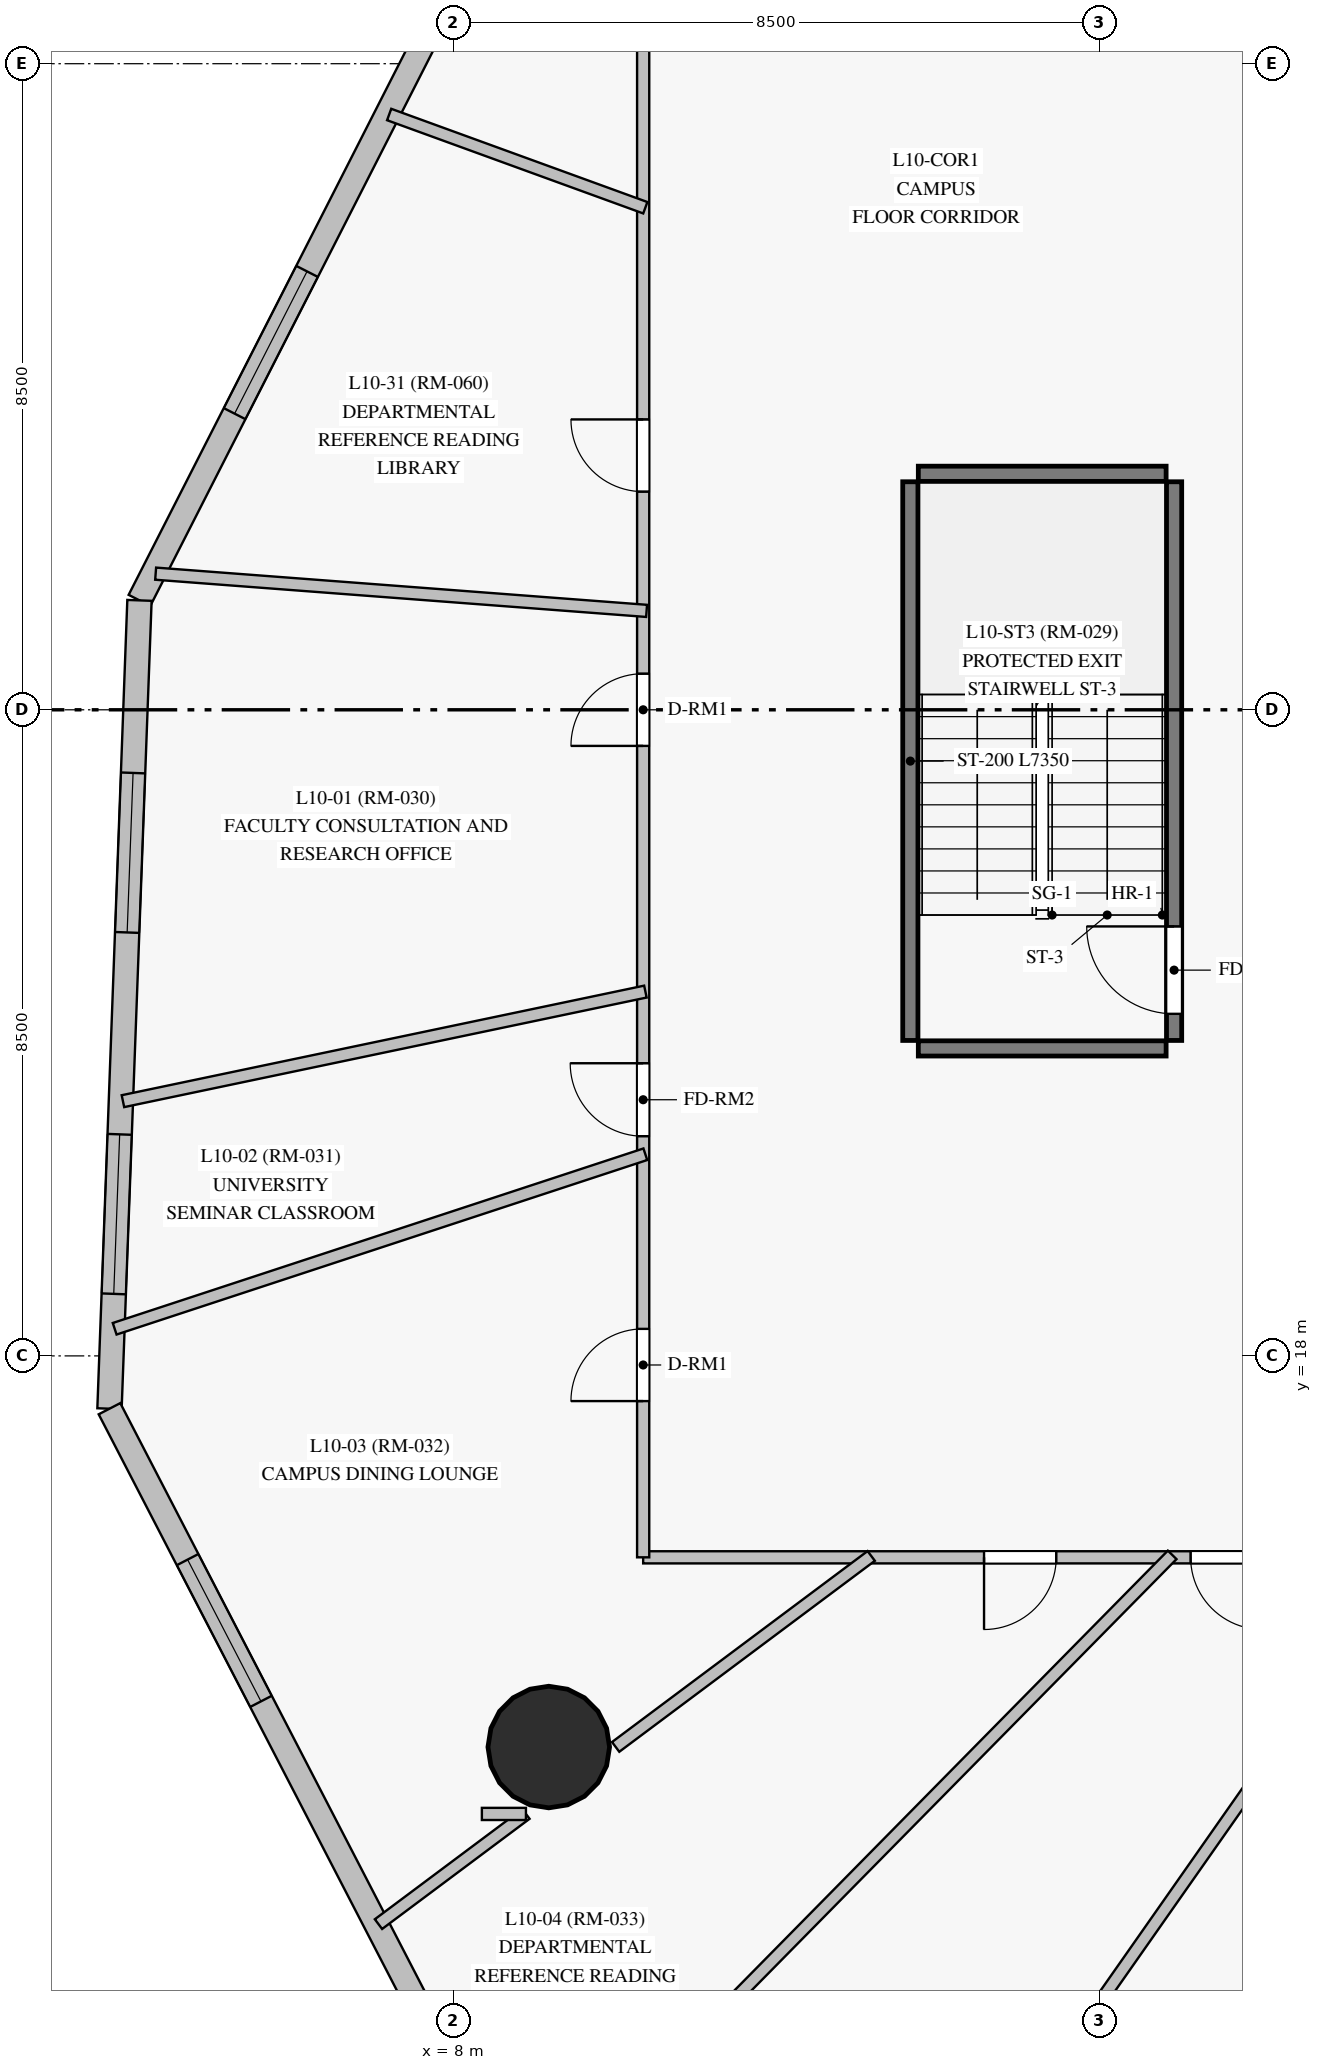
"""IFC4 building model, lengths in metres.
Left out: names, types, materials, properties, quantities, classifications, styles, units other than length and angle.
Written with IfcOpenShell. Run it as: python <this file> out.ifc"""

import sys

from ifc_helpers import new_model, si_unit, direction, frame, frame_2d, origin, origin_with_axes, origin_2d, place, context, subcontext, project, spatial, rectangle, circle, extrude, source, transform, mapped, element, fill, save


model = new_model("IFC4")
c1 = context("Model", 3, precision=1e-05, world=origin(), true_north=direction((0.0, 1.0)))
c2 = subcontext(c1, "Body", "Model", "MODEL_VIEW")
j1 = project(units=[si_unit("LENGTHUNIT", "METRE"), si_unit("PLANEANGLEUNIT", "RADIAN")], contexts=[c1])
p1 = place(None, origin())
s1 = spatial("IfcSite", under=j1, at=p1, CompositionType="ELEMENT")
p2 = place(p1, origin())
s2 = spatial("IfcBuilding", under=s1, at=p2, CompositionType="ELEMENT")
p3 = place(p2, frame((0.0, 0.0, 40.9)))
s3 = spatial("IfcBuildingStorey", under=s2, at=p3, CompositionType="ELEMENT", Elevation=40.9)
m1 = source(origin_with_axes(), c2, "Body", "SweptSolid", [
    extrude(circle(Radius=0.8, at=origin_2d()), origin(), (0.0, 0.0, 1.0), 3.6),
])
p4 = place(p3, frame((9.258, 12.854, 0.0), z_axis=(0.0, 0.0, 1.0), x_axis=(1.0, 0.0, 0.0)))
e1 = element("IfcColumn", 1, at=p4, inside=s3, PredefinedType="COLUMN", context=c2, shape_type="MappedRepresentation", body=[
    mapped(m1, transform((0.0, 0.0, 0.0), scale=1.0)),
])
p5 = place(p3, frame((10.893, 41.719, 0.0), z_axis=(0.0, 0.0, 1.0), x_axis=(-0.453939025407, -0.891032749798, 0.0)))
e2 = element("IfcWall", 2, at=p5, inside=s3, PredefinedType="SOLIDWALL", context=c2, shape_type="SweptSolid", body=[
    extrude(rectangle(XDim=15.464, YDim=0.32, at=frame_2d((7.732, 0.0))), origin(), (0.0, 0.0, 1.0), 3.35),
])
p6 = place(p5, frame((1.223, 0.0, 0.85)))
e3 = element("IfcOpeningElement", 3, at=p6, cuts=e2, PredefinedType="OPENING", context=c2, shape_type="SweptSolid", body=[
    extrude(rectangle(XDim=2.1, YDim=1.95, at=frame_2d((1.05, 0.975))), frame((0.0, 0.17, 0.0), z_axis=(0.0, -1.0, 0.0), x_axis=(1.0, 0.0, 0.0)), (0.0, 0.0, 1.0), 0.34),
])
p7 = place(p5, frame((5.01, 0.0, 0.85)))
e4 = element("IfcOpeningElement", 4, at=p7, cuts=e2, PredefinedType="OPENING", context=c2, shape_type="SweptSolid", body=[
    extrude(rectangle(XDim=2.1, YDim=1.95, at=frame_2d((1.05, 0.975))), frame((0.0, 0.17, 0.0), z_axis=(0.0, -1.0, 0.0), x_axis=(1.0, 0.0, 0.0)), (0.0, 0.0, 1.0), 0.34),
])
p8 = place(p5, frame((10.607, 0.0, 0.85)))
e5 = element("IfcOpeningElement", 5, at=p8, cuts=e2, PredefinedType="OPENING", context=c2, shape_type="SweptSolid", body=[
    extrude(rectangle(XDim=2.1, YDim=1.95, at=frame_2d((1.05, 0.975))), frame((0.0, 0.17, 0.0), z_axis=(0.0, -1.0, 0.0), x_axis=(1.0, 0.0, 0.0)), (0.0, 0.0, 1.0), 0.34),
])
p9 = place(p3, frame((3.873, 27.939, 0.0), z_axis=(0.0, 0.0, 1.0), x_axis=(-0.037051542076, -0.999313355875, 0.0)))
e6 = element("IfcWall", 6, at=p9, inside=s3, PredefinedType="SOLIDWALL", context=c2, shape_type="SweptSolid", body=[
    extrude(rectangle(XDim=10.642, YDim=0.32, at=frame_2d((5.321, 0.0))), origin(), (0.0, 0.0, 1.0), 3.35),
])
p10 = place(p9, frame((2.272, 0.0, 0.85)))
e7 = element("IfcOpeningElement", 7, at=p10, cuts=e6, PredefinedType="OPENING", context=c2, shape_type="SweptSolid", body=[
    extrude(rectangle(XDim=2.1, YDim=1.95, at=frame_2d((1.05, 0.975))), frame((0.0, 0.17, 0.0), z_axis=(0.0, -1.0, 0.0), x_axis=(1.0, 0.0, 0.0)), (0.0, 0.0, 1.0), 0.34),
])
p11 = place(p9, frame((7.03, 0.0, 0.85)))
e8 = element("IfcOpeningElement", 8, at=p11, cuts=e6, PredefinedType="OPENING", context=c2, shape_type="SweptSolid", body=[
    extrude(rectangle(XDim=2.1, YDim=1.95, at=frame_2d((1.05, 0.975))), frame((0.0, 0.17, 0.0), z_axis=(0.0, -1.0, 0.0), x_axis=(1.0, 0.0, 0.0)), (0.0, 0.0, 1.0), 0.34),
])
p12 = place(p3, frame((3.479, 17.305, 0.0), z_axis=(0.0, 0.0, 1.0), x_axis=(0.459668719491, -0.888090461789, 0.0)))
e9 = element("IfcWall", 9, at=p12, inside=s3, PredefinedType="SOLIDWALL", context=c2, shape_type="SweptSolid", body=[
    extrude(rectangle(XDim=13.212, YDim=0.32, at=frame_2d((6.606, 0.0))), origin(), (0.0, 0.0, 1.0), 3.35),
])
p13 = place(p12, frame((2.236, 0.0, 0.85)))
e10 = element("IfcOpeningElement", 10, at=p13, cuts=e9, PredefinedType="OPENING", context=c2, shape_type="SweptSolid", body=[
    extrude(rectangle(XDim=2.1, YDim=1.95, at=frame_2d((1.05, 0.975))), frame((0.0, 0.17, 0.0), z_axis=(0.0, -1.0, 0.0), x_axis=(1.0, 0.0, 0.0)), (0.0, 0.0, 1.0), 0.34),
])
p14 = place(p3, frame((14.015, 22.15, 0.0), z_axis=(0.0, 0.0, 1.0), x_axis=(0.0, 1.0, 0.0)))
e11 = element("IfcWall", 11, at=p14, inside=s3, PredefinedType="SHEAR", context=c2, shape_type="SweptSolid", body=[
    extrude(rectangle(XDim=7.35, YDim=0.2, at=frame_2d((3.675, 0.0))), origin(), (0.0, 0.0, 1.0), 3.35),
])
p15 = place(p3, frame((17.485, 22.15, 0.0), z_axis=(0.0, 0.0, 1.0), x_axis=(0.0, 1.0, 0.0)))
e12 = element("IfcWall", 12, at=p15, inside=s3, PredefinedType="SHEAR", context=c2, shape_type="SweptSolid", body=[
    extrude(rectangle(XDim=7.35, YDim=0.2, at=frame_2d((3.675, 0.0))), origin(), (0.0, 0.0, 1.0), 3.35),
])
p16 = place(p15, frame((0.35, 0.0, 0.0)))
e13 = element("IfcOpeningElement", 13, at=p16, cuts=e12, PredefinedType="OPENING", context=c2, shape_type="SweptSolid", body=[
    extrude(rectangle(XDim=1.15, YDim=2.15, at=frame_2d((0.575, 1.075))), frame((0.0, 0.11, 0.0), z_axis=(0.0, -1.0, 0.0), x_axis=(1.0, 0.0, 0.0)), (0.0, 0.0, 1.0), 0.22),
])
for number, where, z_axis, x_axis in (
    (14, (14.12, 22.045, 0.0), (0.0, 0.0, 1.0), (1.0, 0.0, 0.0)),
    (15, (14.12, 29.605, 0.0), (0.0, 0.0, 1.0), (1.0, 0.0, 0.0)),
):
    element("IfcWall", number, at=place(p3, frame(where, z_axis=z_axis, x_axis=x_axis)), inside=s3, PredefinedType="SHEAR", context=c2, shape_type="SweptSolid", body=[
        extrude(rectangle(XDim=3.26, YDim=0.2, at=frame_2d((1.63, 0.0))), origin(), (0.0, 0.0, 1.0), 3.35),
    ])
p17 = place(p3, frame((40.25, 15.35, 0.0), z_axis=(0.0, 0.0, 1.0), x_axis=(-1.0, 0.0, 0.0)))
e16 = element("IfcWall", 16, at=p17, inside=s3, PredefinedType="PARTITIONING", context=c2, shape_type="SweptSolid", body=[
    extrude(rectangle(XDim=29.75, YDim=0.16, at=frame_2d((14.875, 0.0))), origin(), (0.0, 0.0, 1.0), 2.7),
])
p18 = place(p17, frame((24.315, 0.0, 0.0)))
e17 = element("IfcOpeningElement", 17, at=p18, cuts=e16, PredefinedType="OPENING", context=c2, shape_type="SweptSolid", body=[
    extrude(rectangle(XDim=0.95, YDim=2.15, at=frame_2d((0.475, 1.075))), frame((0.0, 0.09, 0.0), z_axis=(0.0, -1.0, 0.0), x_axis=(1.0, 0.0, 0.0)), (0.0, 0.0, 1.0), 0.18),
])
p19 = place(p17, frame((21.597, 0.0, 0.0)))
e18 = element("IfcOpeningElement", 18, at=p19, cuts=e16, PredefinedType="OPENING", context=c2, shape_type="SweptSolid", body=[
    extrude(rectangle(XDim=0.95, YDim=2.15, at=frame_2d((0.475, 1.075))), frame((0.0, 0.09, 0.0), z_axis=(0.0, -1.0, 0.0), x_axis=(1.0, 0.0, 0.0)), (0.0, 0.0, 1.0), 0.18),
])
p20 = place(p17, frame((18.423, 0.0, 0.0)))
e19 = element("IfcOpeningElement", 19, at=p20, cuts=e16, PredefinedType="OPENING", context=c2, shape_type="SweptSolid", body=[
    extrude(rectangle(XDim=0.95, YDim=2.15, at=frame_2d((0.475, 1.075))), frame((0.0, 0.09, 0.0), z_axis=(0.0, -1.0, 0.0), x_axis=(1.0, 0.0, 0.0)), (0.0, 0.0, 1.0), 0.18),
])
p21 = place(p17, frame((15.67, 0.0, 0.0)))
e20 = element("IfcOpeningElement", 20, at=p21, cuts=e16, PredefinedType="OPENING", context=c2, shape_type="SweptSolid", body=[
    extrude(rectangle(XDim=0.95, YDim=2.15, at=frame_2d((0.475, 1.075))), frame((0.0, 0.09, 0.0), z_axis=(0.0, -1.0, 0.0), x_axis=(1.0, 0.0, 0.0)), (0.0, 0.0, 1.0), 0.18),
])
p22 = place(p17, frame((13.91, 0.0, 0.0)))
e21 = element("IfcOpeningElement", 21, at=p22, cuts=e16, PredefinedType="OPENING", context=c2, shape_type="SweptSolid", body=[
    extrude(rectangle(XDim=0.95, YDim=2.15, at=frame_2d((0.475, 1.075))), frame((0.0, 0.09, 0.0), z_axis=(0.0, -1.0, 0.0), x_axis=(1.0, 0.0, 0.0)), (0.0, 0.0, 1.0), 0.18),
])
p23 = place(p17, frame((9.938, 0.0, 0.0)))
e22 = element("IfcOpeningElement", 22, at=p23, cuts=e16, PredefinedType="OPENING", context=c2, shape_type="SweptSolid", body=[
    extrude(rectangle(XDim=0.95, YDim=2.15, at=frame_2d((0.475, 1.075))), frame((0.0, 0.09, 0.0), z_axis=(0.0, -1.0, 0.0), x_axis=(1.0, 0.0, 0.0)), (0.0, 0.0, 1.0), 0.18),
])
p24 = place(p17, frame((6.522, 0.0, 0.0)))
e23 = element("IfcOpeningElement", 23, at=p24, cuts=e16, PredefinedType="OPENING", context=c2, shape_type="SweptSolid", body=[
    extrude(rectangle(XDim=0.95, YDim=2.15, at=frame_2d((0.475, 1.075))), frame((0.0, 0.09, 0.0), z_axis=(0.0, -1.0, 0.0), x_axis=(1.0, 0.0, 0.0)), (0.0, 0.0, 1.0), 0.18),
])
p25 = place(p3, frame((10.5, 15.35, 0.0), z_axis=(0.0, 0.0, 1.0), x_axis=(0.0, 1.0, 0.0)))
e24 = element("IfcWall", 24, at=p25, inside=s3, PredefinedType="PARTITIONING", context=c2, shape_type="SweptSolid", body=[
    extrude(rectangle(XDim=22.3, YDim=0.16, at=frame_2d((11.15, 0.0))), origin(), (0.0, 0.0, 1.0), 2.75),
])
p26 = place(p25, frame((10.675, 0.0, 0.0)))
e25 = element("IfcOpeningElement", 25, at=p26, cuts=e24, PredefinedType="OPENING", context=c2, shape_type="SweptSolid", body=[
    extrude(rectangle(XDim=0.95, YDim=2.15, at=frame_2d((0.475, 1.075))), frame((0.0, 0.09, 0.0), z_axis=(0.0, -1.0, 0.0), x_axis=(1.0, 0.0, 0.0)), (0.0, 0.0, 1.0), 0.18),
])
p27 = place(p25, frame((5.54, 0.0, 0.0)))
e26 = element("IfcOpeningElement", 26, at=p27, cuts=e24, PredefinedType="OPENING", context=c2, shape_type="SweptSolid", body=[
    extrude(rectangle(XDim=0.96, YDim=2.15, at=frame_2d((0.48, 1.075))), frame((0.0, 0.09, 0.0), z_axis=(0.0, -1.0, 0.0), x_axis=(1.0, 0.0, 0.0)), (0.0, 0.0, 1.0), 0.18),
])
p28 = place(p25, frame((2.055, 0.0, 0.0)))
e27 = element("IfcOpeningElement", 27, at=p28, cuts=e24, PredefinedType="OPENING", context=c2, shape_type="SweptSolid", body=[
    extrude(rectangle(XDim=0.95, YDim=2.15, at=frame_2d((0.475, 1.075))), frame((0.0, 0.09, 0.0), z_axis=(0.0, -1.0, 0.0), x_axis=(1.0, 0.0, 0.0)), (0.0, 0.0, 1.0), 0.18),
])
p29 = place(p25, frame((14.02, 0.0, 0.0)))
e28 = element("IfcOpeningElement", 28, at=p29, cuts=e24, PredefinedType="OPENING", context=c2, shape_type="SweptSolid", body=[
    extrude(rectangle(XDim=0.95, YDim=2.15, at=frame_2d((0.475, 1.075))), frame((0.0, 0.09, 0.0), z_axis=(0.0, -1.0, 0.0), x_axis=(1.0, 0.0, 0.0)), (0.0, 0.0, 1.0), 0.18),
])
p30 = place(p3, frame((23.048, 15.377, 0.0), z_axis=(0.0, 0.0, 1.0), x_axis=(-0.435779145483, -0.900053629715, 0.0)))
e29 = element("IfcWall", 29, at=p30, inside=s3, PredefinedType="PARTITIONING", context=c2, shape_type="SweptSolid", body=[
    extrude(rectangle(XDim=13.948, YDim=0.16, at=frame_2d((6.974, 0.0))), origin(), (0.0, 0.0, 1.0), 3.35),
])
p31 = place(p3, frame((17.46, 15.382, 0.0), z_axis=(0.0, 0.0, 1.0), x_axis=(-0.701892154134, -0.712283232967, 0.0)))
e30 = element("IfcWall", 30, at=p31, inside=s3, PredefinedType="PARTITIONING", context=c2, shape_type="SweptSolid", body=[
    extrude(rectangle(XDim=12.1, YDim=0.16, at=frame_2d((6.05, 0.0))), origin(), (0.0, 0.0, 1.0), 3.35),
])
p32 = place(p3, frame((20.628, 15.375, 0.0), z_axis=(0.0, 0.0, 1.0), x_axis=(-0.574028069181, -0.818835621961, 0.0)))
e31 = element("IfcWall", 31, at=p32, inside=s3, PredefinedType="PARTITIONING", context=c2, shape_type="SweptSolid", body=[
    extrude(rectangle(XDim=7.355, YDim=0.16, at=frame_2d((3.677, 0.0))), origin(), (0.0, 0.0, 1.0), 2.7),
])
p33 = place(p3, frame((10.529, 20.653, 0.0), z_axis=(0.0, 0.0, 1.0), x_axis=(-0.949941357918, -0.312428258191, 0.0)))
e32 = element("IfcWall", 32, at=p33, inside=s3, PredefinedType="PARTITIONING", context=c2, shape_type="SweptSolid", body=[
    extrude(rectangle(XDim=7.349, YDim=0.16, at=frame_2d((3.675, 0.0))), origin(), (0.0, 0.0, 1.0), 3.35),
])
p34 = place(p3, frame((10.529, 22.792, 0.0), z_axis=(0.0, 0.0, 1.0), x_axis=(-0.978711769211, -0.205239549813, 0.0)))
e33 = element("IfcWall", 33, at=p34, inside=s3, PredefinedType="PARTITIONING", context=c2, shape_type="SweptSolid", body=[
    extrude(rectangle(XDim=7.023, YDim=0.16, at=frame_2d((3.511, 0.0))), origin(), (0.0, 0.0, 1.0), 3.35),
])
p35 = place(p3, frame((4.086, 28.291, 0.0), z_axis=(0.0, 0.0, 1.0), x_axis=(0.997137480557, -0.075609819921, 0.0)))
e34 = element("IfcWall", 34, at=p35, inside=s3, PredefinedType="PARTITIONING", context=c2, shape_type="SweptSolid", body=[
    extrude(rectangle(XDim=6.477, YDim=0.16, at=frame_2d((3.239, 0.0))), origin(), (0.0, 0.0, 1.0), 3.35),
])
p36 = place(p3, frame((13.5, 15.368, 0.0), z_axis=(0.0, 0.0, 1.0), x_axis=(-0.801087584636, -0.598547142456, 0.0)))
e35 = element("IfcWall", 35, at=p36, inside=s3, PredefinedType="PARTITIONING", context=c2, shape_type="SweptSolid", body=[
    extrude(rectangle(XDim=4.197, YDim=0.16, at=frame_2d((2.099, 0.0))), origin(), (0.0, 0.0, 1.0), 2.7),
])
p37 = place(p3, frame((10.528, 33.105, 0.0), z_axis=(0.0, 0.0, 1.0), x_axis=(-0.939697983434, 0.342005409213, 0.0)))
e36 = element("IfcWall", 36, at=p37, inside=s3, PredefinedType="PARTITIONING", context=c2, shape_type="SweptSolid", body=[
    extrude(rectangle(XDim=3.586, YDim=0.16, at=frame_2d((1.793, 0.0))), origin(), (0.0, 0.0, 1.0), 3.35),
])
p38 = place(p3, frame((8.958, 11.974, 0.0), z_axis=(0.0, 0.0, 1.0), x_axis=(-0.801075279983, -0.598563610487, 0.0)))
e37 = element("IfcWall", 37, at=p38, inside=s3, PredefinedType="PARTITIONING", context=c2, shape_type="SweptSolid", body=[
    extrude(rectangle(XDim=2.422, YDim=0.16, at=frame_2d((1.211, 0.0))), origin(), (0.0, 0.0, 1.0), 3.02),
])
p39 = place(p3, frame((8.378, 11.974, 0.0), z_axis=(0.0, 0.0, 1.0), x_axis=(1.0, 0.0, 0.0)))
e38 = element("IfcWall", 38, at=p39, inside=s3, PredefinedType="PARTITIONING", context=c2, shape_type="SweptSolid", body=[
    extrude(rectangle(XDim=0.58, YDim=0.16, at=frame_2d((0.29, 0.0))), origin(), (0.0, 0.0, 1.0), 3.35),
])
m2 = source(origin_with_axes(), c2, "Body", "SweptSolid", [
    extrude(rectangle(XDim=2.1, YDim=1.95, at=frame_2d((1.05, 0.975))), frame((0.0, 0.03, 0.0), z_axis=(0.0, -1.0, 0.0), x_axis=(1.0, 0.0, 0.0)), (0.0, 0.0, 1.0), 0.06),
])
p40 = place(p8, origin())
e39 = element("IfcWindow", 39, at=p40, inside=s3, PartitioningType="SINGLE_PANEL", PredefinedType="WINDOW", context=c2, shape_type="MappedRepresentation", body=[
    mapped(m2, transform((0.0, 0.0, 0.0), scale=1.0)),
])
fill(e5, e39)
p41 = place(p10, origin())
e40 = element("IfcWindow", 40, at=p41, inside=s3, PartitioningType="SINGLE_PANEL", PredefinedType="WINDOW", context=c2, shape_type="MappedRepresentation", body=[
    mapped(m2, transform((0.0, 0.0, 0.0), scale=1.0)),
])
fill(e7, e40)
p42 = place(p11, origin())
e41 = element("IfcWindow", 41, at=p42, inside=s3, PartitioningType="SINGLE_PANEL", PredefinedType="WINDOW", context=c2, shape_type="MappedRepresentation", body=[
    mapped(m2, transform((0.0, 0.0, 0.0), scale=1.0)),
])
fill(e8, e41)
p43 = place(p13, origin())
e42 = element("IfcWindow", 42, at=p43, inside=s3, PartitioningType="SINGLE_PANEL", PredefinedType="WINDOW", context=c2, shape_type="MappedRepresentation", body=[
    mapped(m2, transform((0.0, 0.0, 0.0), scale=1.0)),
])
fill(e10, e42)
m3 = source(origin_with_axes(), c2, "Body", "SweptSolid", [
    extrude(rectangle(XDim=1.15, YDim=2.15, at=frame_2d((0.575, 1.075))), frame((0.0, 0.025, 0.0), z_axis=(0.0, -1.0, 0.0), x_axis=(1.0, 0.0, 0.0)), (0.0, 0.0, 1.0), 0.05),
])
p44 = place(p16, origin())
e43 = element("IfcDoor", 43, at=p44, inside=s3, OperationType="SINGLE_SWING_RIGHT", PredefinedType="DOOR", context=c2, shape_type="MappedRepresentation", body=[
    mapped(m3, transform((0.0, 0.0, 0.0), scale=1.0)),
])
fill(e13, e43)
m4 = source(origin_with_axes(), c2, "Body", "SweptSolid", [
    extrude(rectangle(XDim=0.95, YDim=2.15, at=frame_2d((0.475, 1.075))), frame((0.0, 0.025, 0.0), z_axis=(0.0, -1.0, 0.0), x_axis=(1.0, 0.0, 0.0)), (0.0, 0.0, 1.0), 0.05),
])
p45 = place(p26, origin())
e44 = element("IfcDoor", 44, at=p45, inside=s3, OperationType="SINGLE_SWING_LEFT", PredefinedType="DOOR", context=c2, shape_type="MappedRepresentation", body=[
    mapped(m4, transform((0.0, 0.0, 0.0), scale=1.0)),
])
fill(e25, e44)
m5 = source(origin_with_axes(), c2, "Body", "SweptSolid", [
    extrude(rectangle(XDim=0.96, YDim=2.15, at=frame_2d((0.48, 1.075))), frame((0.0, 0.025, 0.0), z_axis=(0.0, -1.0, 0.0), x_axis=(1.0, 0.0, 0.0)), (0.0, 0.0, 1.0), 0.05),
])
p46 = place(p27, origin())
e45 = element("IfcDoor", 45, at=p46, inside=s3, OperationType="SINGLE_SWING_RIGHT", PredefinedType="DOOR", context=c2, shape_type="MappedRepresentation", body=[
    mapped(m5, transform((0.0, 0.0, 0.0), scale=1.0)),
])
fill(e26, e45)
p47 = place(p28, origin())
e46 = element("IfcDoor", 46, at=p47, inside=s3, OperationType="SINGLE_SWING_LEFT", PredefinedType="DOOR", context=c2, shape_type="MappedRepresentation", body=[
    mapped(m4, transform((0.0, 0.0, 0.0), scale=1.0)),
])
fill(e27, e46)
p48 = place(p18, origin())
e47 = element("IfcDoor", 47, at=p48, inside=s3, OperationType="SINGLE_SWING_RIGHT", PredefinedType="DOOR", context=c2, shape_type="MappedRepresentation", body=[
    mapped(m4, transform((0.0, 0.0, 0.0), scale=1.0)),
])
fill(e17, e47)
p49 = place(p19, origin())
e48 = element("IfcDoor", 48, at=p49, inside=s3, OperationType="SINGLE_SWING_LEFT", PredefinedType="DOOR", context=c2, shape_type="MappedRepresentation", body=[
    mapped(m4, transform((0.0, 0.0, 0.0), scale=1.0)),
])
fill(e18, e48)
p50 = place(p29, origin())
e49 = element("IfcDoor", 49, at=p50, inside=s3, OperationType="SINGLE_SWING_RIGHT", PredefinedType="DOOR", context=c2, shape_type="MappedRepresentation", body=[
    mapped(m4, transform((0.0, 0.0, 0.0), scale=1.0)),
])
fill(e28, e49)
save(model, sys.argv[1])
